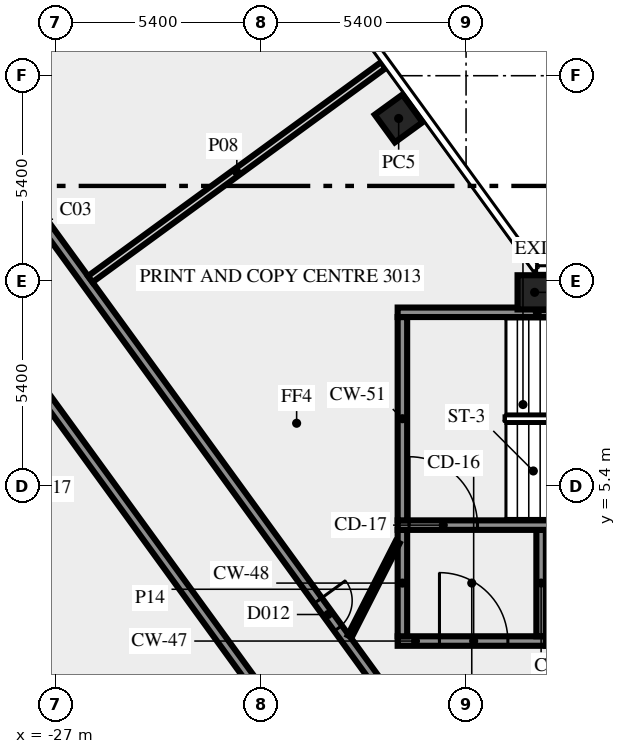
"""IFC4 building model, lengths in metres.
Left out: names, types, materials, properties, quantities, classifications, styles, units other than length and angle.
Written with IfcOpenShell. Run it as: python <this file> out.ifc"""

import sys

from ifc_helpers import new_model, si_unit, direction, frame, frame_2d, origin, origin_2d, place, context, subcontext, project, spatial, rectangle, extrude, element, fill, save


model = new_model("IFC4")
c1 = context("Model", 3, precision=1e-05, world=origin(), true_north=direction((0.0, 1.0)))
c2 = subcontext(c1, "Body", "Model", "MODEL_VIEW")
j1 = project(units=[si_unit("LENGTHUNIT", "METRE"), si_unit("PLANEANGLEUNIT", "RADIAN")], contexts=[c1])
p1 = place(None, origin())
s1 = spatial("IfcSite", under=j1, at=p1, CompositionType="ELEMENT")
p2 = place(p1, origin())
s2 = spatial("IfcBuilding", under=s1, at=p2, CompositionType="ELEMENT")
p3 = place(p2, frame((0.0, 0.0, 129.0)))
s3 = spatial("IfcBuildingStorey", under=s2, at=p3, CompositionType="ELEMENT", Elevation=129.0)
for number, where, z_axis, x_axis in (
    (1, (-17.974, 15.075, 0.0), (0.0, 0.0, 1.0), (-0.588, 0.809, 0.0)),
    (2, (-14.395, 10.5, 0.0), (0.0, 0.0, 1.0), (-1.0, 0.0, 0.0)),
):
    element("IfcColumn", number, at=place(p3, frame(where, z_axis=z_axis, x_axis=x_axis)), inside=s3, PredefinedType="COLUMN", context=c2, shape_type="SweptSolid", body=[
        extrude(rectangle(XDim=0.9, YDim=0.9, at=origin_2d()), origin(), (0.0, 0.0, 1.0), 3.4),
    ])
p4 = place(p3, frame((-18.0, 1.325, 0.0), z_axis=(0.0, 0.0, 1.0), x_axis=(1.0, 0.0, 0.0)))
e3 = element("IfcWall", 3, at=p4, inside=s3, PredefinedType="SHEAR", context=c2, shape_type="SweptSolid", body=[
    extrude(rectangle(XDim=3.9, YDim=0.25, at=frame_2d((1.95, 0.0))), origin(), (0.0, 0.0, 1.0), 3.4),
])
p5 = place(p4, frame((1.1, 0.0, 0.0)))
e4 = element("IfcOpeningElement", 4, at=p5, cuts=e3, PredefinedType="OPENING", context=c2, shape_type="SweptSolid", body=[
    extrude(rectangle(XDim=1.8, YDim=2.1, at=frame_2d((0.9, 1.05))), frame((0.0, 0.135, 0.0), z_axis=(0.0, -1.0, 0.0), x_axis=(1.0, 0.0, 0.0)), (0.0, 0.0, 1.0), 0.27),
])
for number, where, z_axis, x_axis in (
    (5, (-17.875, 1.45, 0.0), (0.0, 0.0, 1.0), (0.0, 1.0, 0.0)),
    (6, (-14.225, 1.45, 0.0), (0.0, 0.0, 1.0), (0.0, 1.0, 0.0)),
):
    element("IfcWall", number, at=place(p3, frame(where, z_axis=z_axis, x_axis=x_axis)), inside=s3, PredefinedType="SHEAR", context=c2, shape_type="SweptSolid", body=[
        extrude(rectangle(XDim=2.8, YDim=0.25, at=frame_2d((1.4, 0.0))), origin(), (0.0, 0.0, 1.0), 3.4),
    ])
p6 = place(p3, frame((-18.0, 4.375, 0.0), z_axis=(0.0, 0.0, 1.0), x_axis=(1.0, 0.0, 0.0)))
e7 = element("IfcWall", 7, at=p6, inside=s3, PredefinedType="SHEAR", context=c2, shape_type="SweptSolid", body=[
    extrude(rectangle(XDim=10.5, YDim=0.25, at=frame_2d((5.25, 0.0))), origin(), (0.0, 0.0, 1.0), 3.4),
])
p7 = place(p6, frame((0.3, 0.0, 0.0)))
e8 = element("IfcOpeningElement", 8, at=p7, cuts=e7, PredefinedType="OPENING", context=c2, shape_type="SweptSolid", body=[
    extrude(rectangle(XDim=1.8, YDim=2.1, at=frame_2d((0.9, 1.05))), frame((0.0, 0.135, 0.0), z_axis=(0.0, -1.0, 0.0), x_axis=(1.0, 0.0, 0.0)), (0.0, 0.0, 1.0), 0.27),
])
p8 = place(p3, frame((-17.875, 4.5, 0.0), z_axis=(0.0, 0.0, 1.0), x_axis=(0.0, 1.0, 0.0)))
e9 = element("IfcWall", 9, at=p8, inside=s3, PredefinedType="SHEAR", context=c2, shape_type="SweptSolid", body=[
    extrude(rectangle(XDim=5.35, YDim=0.25, at=frame_2d((2.675, 0.0))), origin(), (0.0, 0.0, 1.0), 3.4),
])
p9 = place(p3, frame((-18.0, 9.975, 0.0), z_axis=(0.0, 0.0, 1.0), x_axis=(1.0, 0.0, 0.0)))
e10 = element("IfcWall", 10, at=p9, inside=s3, PredefinedType="SHEAR", context=c2, shape_type="SweptSolid", body=[
    extrude(rectangle(XDim=10.5, YDim=0.25, at=frame_2d((5.25, 0.0))), origin(), (0.0, 0.0, 1.0), 3.4),
])
p10 = place(p9, frame((4.5, 0.0, 1.0)))
e11 = element("IfcOpeningElement", 11, at=p10, cuts=e10, PredefinedType="OPENING", context=c2, shape_type="SweptSolid", body=[
    extrude(rectangle(XDim=1.2, YDim=1.2, at=frame_2d((0.6, 0.6))), frame((0.0, 0.135, 0.0), z_axis=(0.0, -1.0, 0.0), x_axis=(1.0, 0.0, 0.0)), (0.0, 0.0, 1.0), 0.27),
])
p11 = place(p3, frame((-20.531, -1.523, 0.0), z_axis=(0.0, 0.0, 1.0), x_axis=(-0.587784522481, 0.809017524614, 0.0)))
e12 = element("IfcWall", 12, at=p11, inside=s3, PredefinedType="SOLIDWALL", context=c2, shape_type="SweptSolid", body=[
    extrude(rectangle(XDim=49.912, YDim=0.25, at=frame_2d((24.956, 0.0))), origin(), (0.0, 0.0, 1.0), 3.4),
])
p12 = place(p11, frame((34.816, 0.0, 0.0)))
e13 = element("IfcOpeningElement", 13, at=p12, cuts=e12, PredefinedType="OPENING", context=c2, shape_type="SweptSolid", body=[
    extrude(rectangle(XDim=0.9, YDim=2.1, at=frame_2d((0.45, 1.05))), frame((0.0, 0.135, 0.0), z_axis=(0.0, -1.0, 0.0), x_axis=(1.0, 0.0, 0.0)), (0.0, 0.0, 1.0), 0.27),
])
p13 = place(p11, frame((33.215, 0.0, 0.0)))
e14 = element("IfcOpeningElement", 14, at=p13, cuts=e12, PredefinedType="OPENING", context=c2, shape_type="SweptSolid", body=[
    extrude(rectangle(XDim=0.9, YDim=2.1, at=frame_2d((0.45, 1.05))), frame((0.0, 0.135, 0.0), z_axis=(0.0, -1.0, 0.0), x_axis=(1.0, 0.0, 0.0)), (0.0, 0.0, 1.0), 0.27),
])
p14 = place(p11, frame((22.916, 0.0, 0.0)))
e15 = element("IfcOpeningElement", 15, at=p14, cuts=e12, PredefinedType="OPENING", context=c2, shape_type="SweptSolid", body=[
    extrude(rectangle(XDim=1.8, YDim=2.1, at=frame_2d((0.9, 1.05))), frame((0.0, 0.135, 0.0), z_axis=(0.0, -1.0, 0.0), x_axis=(1.0, 0.0, 0.0)), (0.0, 0.0, 1.0), 0.27),
])
p15 = place(p11, frame((0.483, 0.0, 0.0)))
e16 = element("IfcOpeningElement", 16, at=p15, cuts=e12, PredefinedType="OPENING", context=c2, shape_type="SweptSolid", body=[
    extrude(rectangle(XDim=1.8, YDim=2.1, at=frame_2d((0.9, 1.05))), frame((0.0, 0.135, 0.0), z_axis=(0.0, -1.0, 0.0), x_axis=(1.0, 0.0, 0.0)), (0.0, 0.0, 1.0), 0.27),
])
p16 = place(p11, frame((25.365, 0.0, 0.0)))
e17 = element("IfcOpeningElement", 17, at=p16, cuts=e12, PredefinedType="OPENING", context=c2, shape_type="SweptSolid", body=[
    extrude(rectangle(XDim=0.9, YDim=2.1, at=frame_2d((0.45, 1.05))), frame((0.0, 0.135, 0.0), z_axis=(0.0, -1.0, 0.0), x_axis=(1.0, 0.0, 0.0)), (0.0, 0.0, 1.0), 0.27),
])
p17 = place(p3, frame((-37.232, 25.972, 0.0), z_axis=(0.0, 0.0, 1.0), x_axis=(0.587786323093, -0.809016216391, 0.0)))
e18 = element("IfcWall", 18, at=p17, inside=s3, PredefinedType="SOLIDWALL", context=c2, shape_type="SweptSolid", body=[
    extrude(rectangle(XDim=33.493, YDim=0.25, at=frame_2d((16.747, 0.0))), origin(), (0.0, 0.0, 1.0), 3.4),
])
p18 = place(p17, frame((9.785, 0.0, 0.0)))
e19 = element("IfcOpeningElement", 19, at=p18, cuts=e18, PredefinedType="OPENING", context=c2, shape_type="SweptSolid", body=[
    extrude(rectangle(XDim=1.8, YDim=2.1, at=frame_2d((0.9, 1.05))), frame((0.0, 0.135, 0.0), z_axis=(0.0, -1.0, 0.0), x_axis=(1.0, 0.0, 0.0)), (0.0, 0.0, 1.0), 0.27),
])
p19 = place(p17, frame((29.152, 0.0, 0.0)))
e20 = element("IfcOpeningElement", 20, at=p19, cuts=e18, PredefinedType="OPENING", context=c2, shape_type="SweptSolid", body=[
    extrude(rectangle(XDim=0.9, YDim=2.1, at=frame_2d((0.45, 1.05))), frame((0.0, 0.135, 0.0), z_axis=(0.0, -1.0, 0.0), x_axis=(1.0, 0.0, 0.0)), (0.0, 0.0, 1.0), 0.27),
])
p20 = place(p17, frame((1.335, 0.0, 0.0)))
e21 = element("IfcOpeningElement", 21, at=p20, cuts=e18, PredefinedType="OPENING", context=c2, shape_type="SweptSolid", body=[
    extrude(rectangle(XDim=0.9, YDim=2.1, at=frame_2d((0.45, 1.05))), frame((0.0, 0.135, 0.0), z_axis=(0.0, -1.0, 0.0), x_axis=(1.0, 0.0, 0.0)), (0.0, 0.0, 1.0), 0.27),
])
p21 = place(p3, frame((-26.089, 10.848, 0.0), z_axis=(0.0, 0.0, 1.0), x_axis=(0.807661302092, 0.589646691759, 0.0)))
e22 = element("IfcWall", 22, at=p21, inside=s3, PredefinedType="SOLIDWALL", context=c2, shape_type="SweptSolid", body=[
    extrude(rectangle(XDim=9.55, YDim=0.2, at=frame_2d((4.775, 0.0))), origin(), (0.0, 0.0, 1.0), 2.5),
])
p22 = place(p3, frame((-19.261, 1.45, 0.0), z_axis=(0.0, 0.0, 1.0), x_axis=(0.453950796792, 0.891026752736, 0.0)))
e23 = element("IfcWall", 23, at=p22, inside=s3, PredefinedType="PARTITIONING", context=c2, shape_type="SweptSolid", body=[
    extrude(rectangle(XDim=2.778, YDim=0.12, at=frame_2d((1.389, 0.0))), origin(), (0.0, 0.0, 1.0), 3.4),
])
p23 = place(p5, origin())
e24 = element("IfcDoor", 24, at=p23, inside=s3, OperationType="DOUBLE_DOOR_SINGLE_SWING", PredefinedType="DOOR", context=c2, shape_type="SweptSolid", body=[
    extrude(rectangle(XDim=1.8, YDim=2.1, at=frame_2d((0.9, 1.05))), frame((0.0, 0.025, 0.0), z_axis=(0.0, -1.0, 0.0), x_axis=(1.0, 0.0, 0.0)), (0.0, 0.0, 1.0), 0.05),
])
fill(e4, e24)
p24 = place(p7, origin())
e25 = element("IfcDoor", 25, at=p24, inside=s3, OperationType="DOUBLE_DOOR_SINGLE_SWING", PredefinedType="DOOR", context=c2, shape_type="SweptSolid", body=[
    extrude(rectangle(XDim=1.8, YDim=2.1, at=frame_2d((0.9, 1.05))), frame((0.0, 0.025, 0.0), z_axis=(0.0, -1.0, 0.0), x_axis=(1.0, 0.0, 0.0)), (0.0, 0.0, 1.0), 0.05),
])
fill(e8, e25)
p25 = place(p19, origin())
e26 = element("IfcDoor", 26, at=p25, inside=s3, OperationType="SINGLE_SWING_RIGHT", PredefinedType="DOOR", context=c2, shape_type="SweptSolid", body=[
    extrude(rectangle(XDim=0.9, YDim=2.1, at=frame_2d((0.45, 1.05))), frame((0.0, 0.025, 0.0), z_axis=(0.0, -1.0, 0.0), x_axis=(1.0, 0.0, 0.0)), (0.0, 0.0, 1.0), 0.05),
])
fill(e20, e26)
save(model, sys.argv[1])
